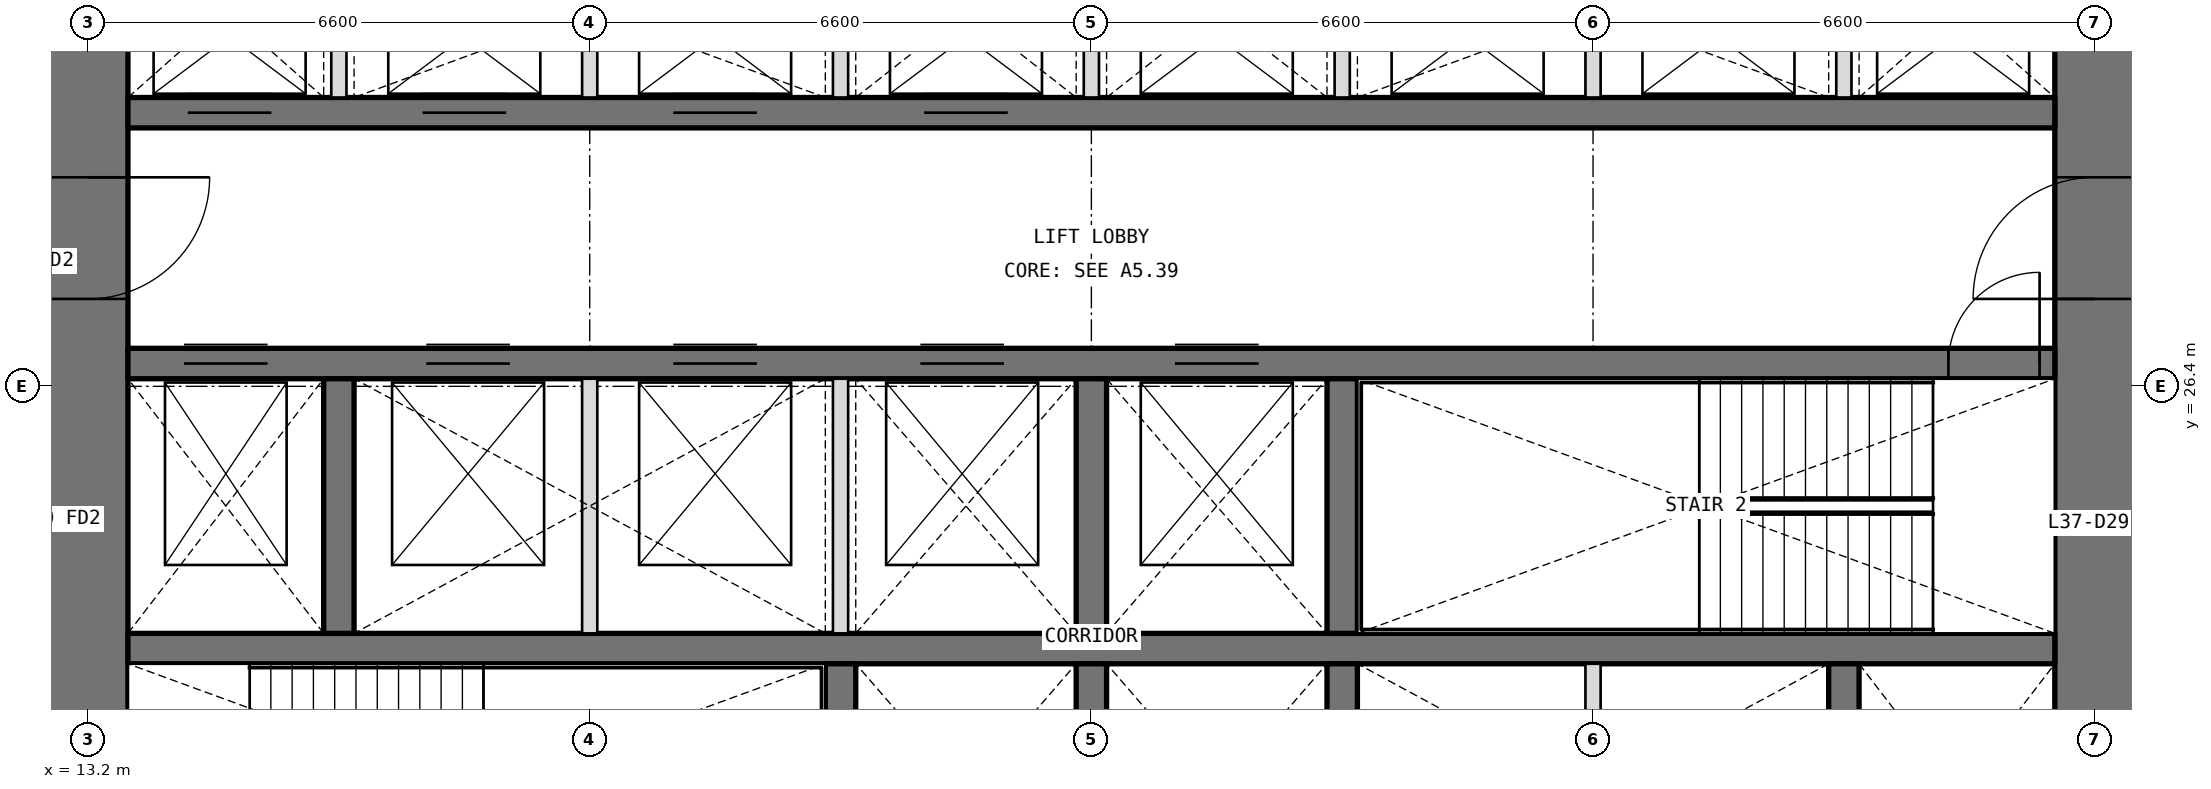
"""IFC4 building model, lengths in metres.
Left out: names, types, materials, properties, quantities, classifications, styles, units other than length and angle.
Written with IfcOpenShell. Run it as: python <this file> out.ifc"""

import sys

from ifc_helpers import new_model, si_unit, direction, frame, frame_2d, origin, place, context, subcontext, project, spatial, rectangle, extrude, element, fill, save


model = new_model("IFC4")
c1 = context("Model", 3, precision=1e-05, world=origin(), true_north=direction((0.0, 1.0)))
c2 = subcontext(c1, "Body", "Model", "MODEL_VIEW")
j1 = project(units=[si_unit("LENGTHUNIT", "METRE"), si_unit("PLANEANGLEUNIT", "RADIAN")], contexts=[c1])
p1 = place(None, origin())
s1 = spatial("IfcSite", under=j1, at=p1, CompositionType="ELEMENT")
p2 = place(p1, origin())
s2 = spatial("IfcBuilding", under=s1, at=p2, CompositionType="ELEMENT")
p3 = place(p2, frame((0.0, 0.0, 164.1)))
s3 = spatial("IfcBuildingStorey", under=s2, at=p3, CompositionType="ELEMENT", Elevation=164.1)
p4 = place(p3, frame((39.6, 13.725, 0.0), z_axis=(0.0, 0.0, 1.0), x_axis=(0.0, 1.0, 0.0)))
e1 = element("IfcWall", 1, at=p4, inside=s3, PredefinedType="SHEAR", context=c2, shape_type="SweptSolid", body=[
    extrude(rectangle(XDim=18.75, YDim=1.05, at=frame_2d((9.375, 0.0))), origin(), (0.0, 0.0, 1.0), 4.2),
])
p5 = place(p4, frame((3.025, 0.0, 0.0)))
e2 = element("IfcOpeningElement", 2, at=p5, cuts=e1, PredefinedType="OPENING", context=c2, shape_type="SweptSolid", body=[
    extrude(rectangle(XDim=1.6, YDim=2.1, at=frame_2d((0.8, 1.05))), frame((0.0, 0.535, 0.0), z_axis=(0.0, -1.0, 0.0), x_axis=(1.0, 0.0, 0.0)), (0.0, 0.0, 1.0), 1.07),
])
p6 = place(p4, frame((13.825, 0.0, 0.0)))
e3 = element("IfcOpeningElement", 3, at=p6, cuts=e1, PredefinedType="OPENING", context=c2, shape_type="SweptSolid", body=[
    extrude(rectangle(XDim=1.6, YDim=2.1, at=frame_2d((0.8, 1.05))), frame((0.0, 0.535, 0.0), z_axis=(0.0, -1.0, 0.0), x_axis=(1.0, 0.0, 0.0)), (0.0, 0.0, 1.0), 1.07),
])
p7 = place(p3, frame((13.2, 32.475, 0.0), z_axis=(0.0, 0.0, 1.0), x_axis=(0.0, -1.0, 0.0)))
e4 = element("IfcWall", 4, at=p7, inside=s3, PredefinedType="SHEAR", context=c2, shape_type="SweptSolid", body=[
    extrude(rectangle(XDim=18.75, YDim=1.05, at=frame_2d((9.375, 0.0))), origin(), (0.0, 0.0, 1.0), 4.2),
])
p8 = place(p7, frame((14.125, 0.0, 0.0)))
e5 = element("IfcOpeningElement", 5, at=p8, cuts=e4, PredefinedType="OPENING", context=c2, shape_type="SweptSolid", body=[
    extrude(rectangle(XDim=1.6, YDim=2.1, at=frame_2d((0.8, 1.05))), frame((0.0, 0.535, 0.0), z_axis=(0.0, -1.0, 0.0), x_axis=(1.0, 0.0, 0.0)), (0.0, 0.0, 1.0), 1.07),
])
p9 = place(p7, frame((3.325, 0.0, 0.0)))
e6 = element("IfcOpeningElement", 6, at=p9, cuts=e4, PredefinedType="OPENING", context=c2, shape_type="SweptSolid", body=[
    extrude(rectangle(XDim=1.6, YDim=2.1, at=frame_2d((0.8, 1.05))), frame((0.0, 0.535, 0.0), z_axis=(0.0, -1.0, 0.0), x_axis=(1.0, 0.0, 0.0)), (0.0, 0.0, 1.0), 1.07),
])
p10 = place(p3, frame((13.725, 22.95, 0.0), z_axis=(0.0, 0.0, 1.0), x_axis=(1.0, 0.0, 0.0)))
e7 = element("IfcWall", 7, at=p10, inside=s3, PredefinedType="SHEAR", context=c2, shape_type="SweptSolid", body=[
    extrude(rectangle(XDim=25.35, YDim=0.4, at=frame_2d((12.675, 0.0))), origin(), (0.0, 0.0, 1.0), 4.2),
])
p11 = place(p3, frame((13.725, 26.7, 0.0), z_axis=(0.0, 0.0, 1.0), x_axis=(1.0, 0.0, 0.0)))
e8 = element("IfcWall", 8, at=p11, inside=s3, PredefinedType="SHEAR", context=c2, shape_type="SweptSolid", body=[
    extrude(rectangle(XDim=25.35, YDim=0.4, at=frame_2d((12.675, 0.0))), origin(), (0.0, 0.0, 1.0), 4.2),
])
p12 = place(p11, frame((23.95, 0.0, 0.0)))
e9 = element("IfcOpeningElement", 9, at=p12, cuts=e8, PredefinedType="OPENING", context=c2, shape_type="SweptSolid", body=[
    extrude(rectangle(XDim=1.2, YDim=2.1, at=frame_2d((0.6, 1.05))), frame((0.0, 0.21, 0.0), z_axis=(0.0, -1.0, 0.0), x_axis=(1.0, 0.0, 0.0)), (0.0, 0.0, 1.0), 0.42),
])
p13 = place(p11, frame((0.738, 0.0, 0.0)))
e10 = element("IfcOpeningElement", 10, at=p13, cuts=e8, PredefinedType="OPENING", context=c2, shape_type="SweptSolid", body=[
    extrude(rectangle(XDim=1.1, YDim=2.1, at=frame_2d((0.55, 1.05))), frame((0.0, 0.21, 0.0), z_axis=(0.0, -1.0, 0.0), x_axis=(1.0, 0.0, 0.0)), (0.0, 0.0, 1.0), 0.42),
])
p14 = place(p11, frame((3.925, 0.0, 0.0)))
e11 = element("IfcOpeningElement", 11, at=p14, cuts=e8, PredefinedType="OPENING", context=c2, shape_type="SweptSolid", body=[
    extrude(rectangle(XDim=1.1, YDim=2.1, at=frame_2d((0.55, 1.05))), frame((0.0, 0.21, 0.0), z_axis=(0.0, -1.0, 0.0), x_axis=(1.0, 0.0, 0.0)), (0.0, 0.0, 1.0), 0.42),
])
p15 = place(p11, frame((7.175, 0.0, 0.0)))
e12 = element("IfcOpeningElement", 12, at=p15, cuts=e8, PredefinedType="OPENING", context=c2, shape_type="SweptSolid", body=[
    extrude(rectangle(XDim=1.1, YDim=2.1, at=frame_2d((0.55, 1.05))), frame((0.0, 0.21, 0.0), z_axis=(0.0, -1.0, 0.0), x_axis=(1.0, 0.0, 0.0)), (0.0, 0.0, 1.0), 0.42),
])
p16 = place(p11, frame((10.425, 0.0, 0.0)))
e13 = element("IfcOpeningElement", 13, at=p16, cuts=e8, PredefinedType="OPENING", context=c2, shape_type="SweptSolid", body=[
    extrude(rectangle(XDim=1.1, YDim=2.1, at=frame_2d((0.55, 1.05))), frame((0.0, 0.21, 0.0), z_axis=(0.0, -1.0, 0.0), x_axis=(1.0, 0.0, 0.0)), (0.0, 0.0, 1.0), 0.42),
])
p17 = place(p11, frame((13.775, 0.0, 0.0)))
e14 = element("IfcOpeningElement", 14, at=p17, cuts=e8, PredefinedType="OPENING", context=c2, shape_type="SweptSolid", body=[
    extrude(rectangle(XDim=1.1, YDim=2.1, at=frame_2d((0.55, 1.05))), frame((0.0, 0.21, 0.0), z_axis=(0.0, -1.0, 0.0), x_axis=(1.0, 0.0, 0.0)), (0.0, 0.0, 1.0), 0.42),
])
p18 = place(p3, frame((13.725, 30.0, 0.0), z_axis=(0.0, 0.0, 1.0), x_axis=(1.0, 0.0, 0.0)))
e15 = element("IfcWall", 15, at=p18, inside=s3, PredefinedType="SHEAR", context=c2, shape_type="SweptSolid", body=[
    extrude(rectangle(XDim=25.35, YDim=0.4, at=frame_2d((12.675, 0.0))), origin(), (0.0, 0.0, 1.0), 4.2),
])
p19 = place(p18, frame((0.788, 0.0, 0.0)))
e16 = element("IfcOpeningElement", 16, at=p19, cuts=e15, PredefinedType="OPENING", context=c2, shape_type="SweptSolid", body=[
    extrude(rectangle(XDim=1.1, YDim=2.1, at=frame_2d((0.55, 1.05))), frame((0.0, 0.21, 0.0), z_axis=(0.0, -1.0, 0.0), x_axis=(1.0, 0.0, 0.0)), (0.0, 0.0, 1.0), 0.42),
])
p20 = place(p18, frame((3.875, 0.0, 0.0)))
e17 = element("IfcOpeningElement", 17, at=p20, cuts=e15, PredefinedType="OPENING", context=c2, shape_type="SweptSolid", body=[
    extrude(rectangle(XDim=1.1, YDim=2.1, at=frame_2d((0.55, 1.05))), frame((0.0, 0.21, 0.0), z_axis=(0.0, -1.0, 0.0), x_axis=(1.0, 0.0, 0.0)), (0.0, 0.0, 1.0), 0.42),
])
p21 = place(p18, frame((7.175, 0.0, 0.0)))
e18 = element("IfcOpeningElement", 18, at=p21, cuts=e15, PredefinedType="OPENING", context=c2, shape_type="SweptSolid", body=[
    extrude(rectangle(XDim=1.1, YDim=2.1, at=frame_2d((0.55, 1.05))), frame((0.0, 0.21, 0.0), z_axis=(0.0, -1.0, 0.0), x_axis=(1.0, 0.0, 0.0)), (0.0, 0.0, 1.0), 0.42),
])
p22 = place(p18, frame((10.475, 0.0, 0.0)))
e19 = element("IfcOpeningElement", 19, at=p22, cuts=e15, PredefinedType="OPENING", context=c2, shape_type="SweptSolid", body=[
    extrude(rectangle(XDim=1.1, YDim=2.1, at=frame_2d((0.55, 1.05))), frame((0.0, 0.21, 0.0), z_axis=(0.0, -1.0, 0.0), x_axis=(1.0, 0.0, 0.0)), (0.0, 0.0, 1.0), 0.42),
])
for number, where, z_axis, x_axis in (
    (20, (23.1, 19.4, 0.0), (0.0, 0.0, 1.0), (0.0, 1.0, 0.0)),
    (21, (26.4, 19.4, 0.0), (0.0, 0.0, 1.0), (0.0, 1.0, 0.0)),
    (22, (29.7, 19.4, 0.0), (0.0, 0.0, 1.0), (0.0, 1.0, 0.0)),
    (23, (36.3, 19.4, 0.0), (0.0, 0.0, 1.0), (0.0, 1.0, 0.0)),
    (24, (16.5, 23.15, 0.0), (0.0, 0.0, 1.0), (0.0, 1.0, 0.0)),
    (25, (26.4, 23.15, 0.0), (0.0, 0.0, 1.0), (0.0, 1.0, 0.0)),
    (26, (29.7, 23.15, 0.0), (0.0, 0.0, 1.0), (0.0, 1.0, 0.0)),
):
    element("IfcWall", number, at=place(p3, frame(where, z_axis=z_axis, x_axis=x_axis)), inside=s3, PredefinedType="SHEAR", context=c2, shape_type="SweptSolid", body=[
        extrude(rectangle(XDim=3.35, YDim=0.4, at=frame_2d((1.675, 0.0))), origin(), (0.0, 0.0, 1.0), 4.2),
    ])
for number, where, z_axis, x_axis in (
    (27, (16.5, 30.2, 0.0), (0.0, 0.0, 1.0), (0.0, 1.0, 0.0)),
    (28, (19.8, 30.2, 0.0), (0.0, 0.0, 1.0), (0.0, 1.0, 0.0)),
    (29, (23.1, 30.2, 0.0), (0.0, 0.0, 1.0), (0.0, 1.0, 0.0)),
    (30, (26.4, 30.2, 0.0), (0.0, 0.0, 1.0), (0.0, 1.0, 0.0)),
    (31, (29.7, 30.2, 0.0), (0.0, 0.0, 1.0), (0.0, 1.0, 0.0)),
    (32, (33.0, 30.2, 0.0), (0.0, 0.0, 1.0), (0.0, 1.0, 0.0)),
    (33, (36.3, 30.2, 0.0), (0.0, 0.0, 1.0), (0.0, 1.0, 0.0)),
):
    element("IfcWall", number, at=place(p3, frame(where, z_axis=z_axis, x_axis=x_axis)), inside=s3, PredefinedType="PARTITIONING", context=c2, shape_type="SweptSolid", body=[
        extrude(rectangle(XDim=2.275, YDim=0.2, at=frame_2d((1.138, 0.0))), origin(), (0.0, 0.0, 1.0), 4.2),
    ])
for number, where, z_axis, x_axis in (
    (34, (33.0, 19.4, 0.0), (0.0, 0.0, 1.0), (0.0, 1.0, 0.0)),
    (35, (19.8, 23.15, 0.0), (0.0, 0.0, 1.0), (0.0, 1.0, 0.0)),
    (36, (23.1, 23.15, 0.0), (0.0, 0.0, 1.0), (0.0, 1.0, 0.0)),
):
    element("IfcWall", number, at=place(p3, frame(where, z_axis=z_axis, x_axis=x_axis)), inside=s3, PredefinedType="PARTITIONING", context=c2, shape_type="SweptSolid", body=[
        extrude(rectangle(XDim=3.35, YDim=0.2, at=frame_2d((1.675, 0.0))), origin(), (0.0, 0.0, 1.0), 4.2),
    ])
p23 = place(p12, origin())
e37 = element("IfcDoor", 37, at=p23, inside=s3, OperationType="SINGLE_SWING_RIGHT", PredefinedType="DOOR", context=c2, shape_type="SweptSolid", body=[
    extrude(rectangle(XDim=1.2, YDim=2.1, at=frame_2d((0.6, 1.05))), frame((0.0, 0.025, 0.0), z_axis=(0.0, -1.0, 0.0), x_axis=(1.0, 0.0, 0.0)), (0.0, 0.0, 1.0), 0.05),
])
fill(e9, e37)
p24 = place(p9, origin())
e38 = element("IfcDoor", 38, at=p24, inside=s3, OperationType="DOUBLE_DOOR_DOUBLE_SWING", PredefinedType="DOOR", context=c2, shape_type="SweptSolid", body=[
    extrude(rectangle(XDim=1.6, YDim=2.1, at=frame_2d((0.8, 1.05))), frame((0.0, 0.025, 0.0), z_axis=(0.0, -1.0, 0.0), x_axis=(1.0, 0.0, 0.0)), (0.0, 0.0, 1.0), 0.05),
])
fill(e6, e38)
p25 = place(p6, origin())
e39 = element("IfcDoor", 39, at=p25, inside=s3, OperationType="DOUBLE_DOOR_DOUBLE_SWING", PredefinedType="DOOR", context=c2, shape_type="SweptSolid", body=[
    extrude(rectangle(XDim=1.6, YDim=2.1, at=frame_2d((0.8, 1.05))), frame((0.0, 0.025, 0.0), z_axis=(0.0, -1.0, 0.0), x_axis=(1.0, 0.0, 0.0)), (0.0, 0.0, 1.0), 0.05),
])
fill(e3, e39)
p26 = place(p19, origin())
e40 = element("IfcDoor", 40, at=p26, inside=s3, OperationType="DOUBLE_DOOR_SLIDING", PredefinedType="DOOR", context=c2, shape_type="SweptSolid", body=[
    extrude(rectangle(XDim=1.1, YDim=2.1, at=frame_2d((0.55, 1.05))), frame((0.0, 0.025, 0.0), z_axis=(0.0, -1.0, 0.0), x_axis=(1.0, 0.0, 0.0)), (0.0, 0.0, 1.0), 0.05),
])
fill(e16, e40)
p27 = place(p20, origin())
e41 = element("IfcDoor", 41, at=p27, inside=s3, OperationType="DOUBLE_DOOR_SLIDING", PredefinedType="DOOR", context=c2, shape_type="SweptSolid", body=[
    extrude(rectangle(XDim=1.1, YDim=2.1, at=frame_2d((0.55, 1.05))), frame((0.0, 0.025, 0.0), z_axis=(0.0, -1.0, 0.0), x_axis=(1.0, 0.0, 0.0)), (0.0, 0.0, 1.0), 0.05),
])
fill(e17, e41)
p28 = place(p21, origin())
e42 = element("IfcDoor", 42, at=p28, inside=s3, OperationType="DOUBLE_DOOR_SLIDING", PredefinedType="DOOR", context=c2, shape_type="SweptSolid", body=[
    extrude(rectangle(XDim=1.1, YDim=2.1, at=frame_2d((0.55, 1.05))), frame((0.0, 0.025, 0.0), z_axis=(0.0, -1.0, 0.0), x_axis=(1.0, 0.0, 0.0)), (0.0, 0.0, 1.0), 0.05),
])
fill(e18, e42)
p29 = place(p22, origin())
e43 = element("IfcDoor", 43, at=p29, inside=s3, OperationType="DOUBLE_DOOR_SLIDING", PredefinedType="DOOR", context=c2, shape_type="SweptSolid", body=[
    extrude(rectangle(XDim=1.1, YDim=2.1, at=frame_2d((0.55, 1.05))), frame((0.0, 0.025, 0.0), z_axis=(0.0, -1.0, 0.0), x_axis=(1.0, 0.0, 0.0)), (0.0, 0.0, 1.0), 0.05),
])
fill(e19, e43)
p30 = place(p13, origin())
e44 = element("IfcDoor", 44, at=p30, inside=s3, OperationType="DOUBLE_DOOR_SLIDING", PredefinedType="DOOR", context=c2, shape_type="SweptSolid", body=[
    extrude(rectangle(XDim=1.1, YDim=2.1, at=frame_2d((0.55, 1.05))), frame((0.0, 0.025, 0.0), z_axis=(0.0, -1.0, 0.0), x_axis=(1.0, 0.0, 0.0)), (0.0, 0.0, 1.0), 0.05),
])
fill(e10, e44)
p31 = place(p14, origin())
e45 = element("IfcDoor", 45, at=p31, inside=s3, OperationType="DOUBLE_DOOR_SLIDING", PredefinedType="DOOR", context=c2, shape_type="SweptSolid", body=[
    extrude(rectangle(XDim=1.1, YDim=2.1, at=frame_2d((0.55, 1.05))), frame((0.0, 0.025, 0.0), z_axis=(0.0, -1.0, 0.0), x_axis=(1.0, 0.0, 0.0)), (0.0, 0.0, 1.0), 0.05),
])
fill(e11, e45)
p32 = place(p15, origin())
e46 = element("IfcDoor", 46, at=p32, inside=s3, OperationType="DOUBLE_DOOR_SLIDING", PredefinedType="DOOR", context=c2, shape_type="SweptSolid", body=[
    extrude(rectangle(XDim=1.1, YDim=2.1, at=frame_2d((0.55, 1.05))), frame((0.0, 0.025, 0.0), z_axis=(0.0, -1.0, 0.0), x_axis=(1.0, 0.0, 0.0)), (0.0, 0.0, 1.0), 0.05),
])
fill(e12, e46)
p33 = place(p16, origin())
e47 = element("IfcDoor", 47, at=p33, inside=s3, OperationType="DOUBLE_DOOR_SLIDING", PredefinedType="DOOR", context=c2, shape_type="SweptSolid", body=[
    extrude(rectangle(XDim=1.1, YDim=2.1, at=frame_2d((0.55, 1.05))), frame((0.0, 0.025, 0.0), z_axis=(0.0, -1.0, 0.0), x_axis=(1.0, 0.0, 0.0)), (0.0, 0.0, 1.0), 0.05),
])
fill(e13, e47)
p34 = place(p17, origin())
e48 = element("IfcDoor", 48, at=p34, inside=s3, OperationType="DOUBLE_DOOR_SLIDING", PredefinedType="DOOR", context=c2, shape_type="SweptSolid", body=[
    extrude(rectangle(XDim=1.1, YDim=2.1, at=frame_2d((0.55, 1.05))), frame((0.0, 0.025, 0.0), z_axis=(0.0, -1.0, 0.0), x_axis=(1.0, 0.0, 0.0)), (0.0, 0.0, 1.0), 0.05),
])
fill(e14, e48)
save(model, sys.argv[1])
